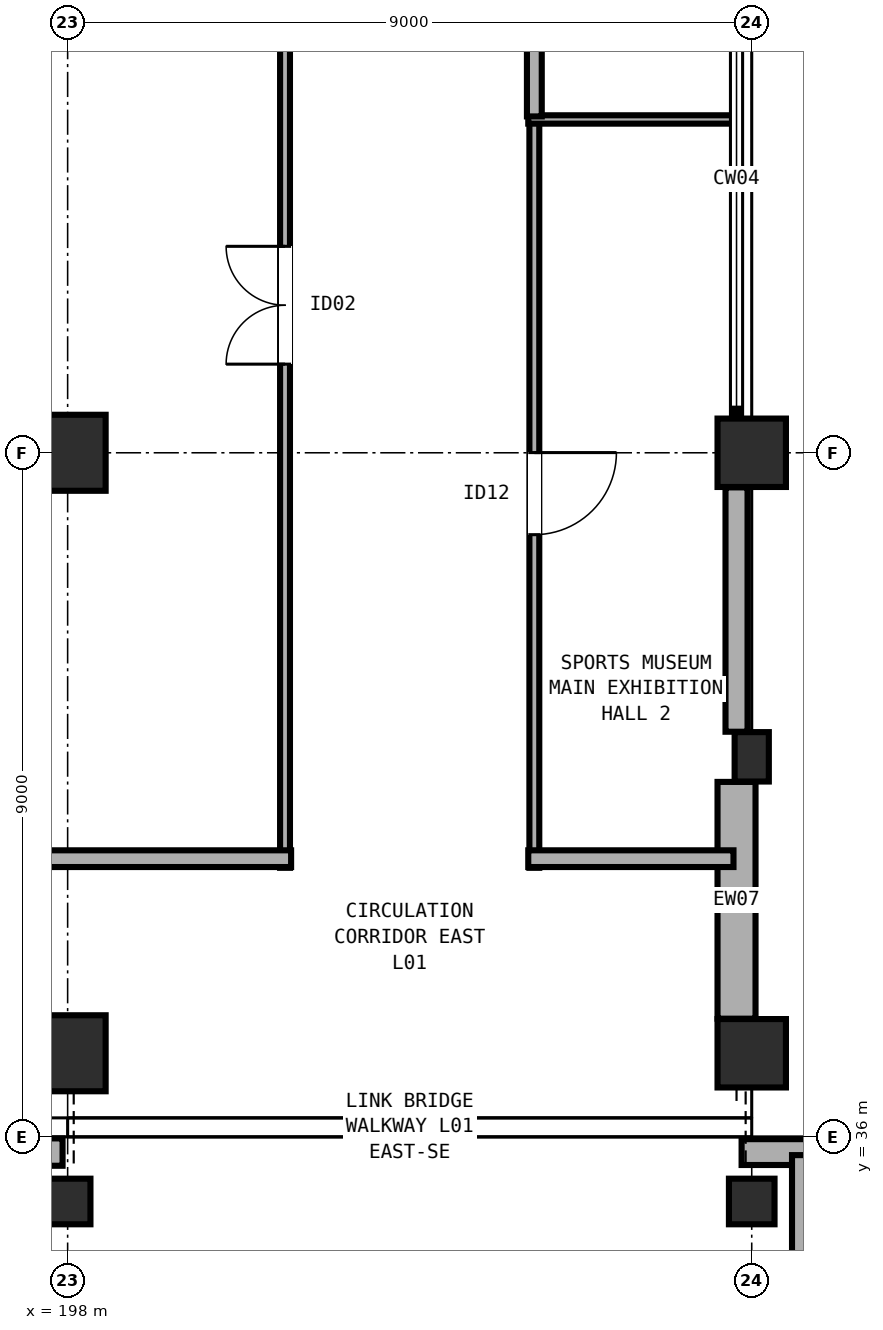
"""IFC4 building model, lengths in metres.
Left out: names, types, materials, properties, quantities, classifications, styles, units other than length and angle.
Written with IfcOpenShell. Run it as: python <this file> out.ifc"""

import sys

from ifc_helpers import new_model, si_unit, direction, frame, frame_2d, origin, origin_2d, place, context, subcontext, project, spatial, rectangle, extrude, element, fill, save


model = new_model("IFC4")
c1 = context("Model", 3, precision=1e-05, world=origin(), true_north=direction((0.0, 1.0)))
c2 = subcontext(c1, "Body", "Model", "MODEL_VIEW")
j1 = project(units=[si_unit("LENGTHUNIT", "METRE"), si_unit("PLANEANGLEUNIT", "RADIAN")], contexts=[c1])
p1 = place(None, origin())
s1 = spatial("IfcSite", under=j1, at=p1, CompositionType="ELEMENT")
p2 = place(p1, origin())
s2 = spatial("IfcBuilding", under=s1, at=p2, CompositionType="ELEMENT")
p3 = place(p2, frame((0.0, 0.0, 4.8)))
s3 = spatial("IfcBuildingStorey", under=s2, at=p3, CompositionType="ELEMENT", Elevation=4.8)
for number, where, z_axis, x_axis in (
    (1, (198.0, 37.1, 0.0), (0.0, 0.0, 1.0), (1.0, 0.0, 0.0)),
    (2, (198.0, 45.0, 0.0), (0.0, 0.0, 1.0), (1.0, 0.0, 0.0)),
):
    element("IfcColumn", number, at=place(p3, frame(where, z_axis=z_axis, x_axis=x_axis)), inside=s3, PredefinedType="COLUMN", context=c2, shape_type="SweptSolid", body=[
        extrude(rectangle(XDim=1.0, YDim=1.0, at=origin_2d()), origin(), (0.0, 0.0, 1.0), 4.8),
    ])
for number, where, z_axis, x_axis in (
    (3, (207.0, 37.1, 0.0), (0.0, 0.0, 1.0), (1.0, 0.0, 0.0)),
    (4, (207.0, 45.0, 0.0), (0.0, 0.0, 1.0), (1.0, 0.0, 0.0)),
):
    element("IfcColumn", number, at=place(p3, frame(where, z_axis=z_axis, x_axis=x_axis)), inside=s3, PredefinedType="COLUMN", context=c2, shape_type="SweptSolid", body=[
        extrude(rectangle(XDim=0.9, YDim=0.9, at=origin_2d()), origin(), (0.0, 0.0, 1.0), 4.8),
    ])
for number, where, z_axis, x_axis in (
    (5, (198.0, 35.15, 0.0), (0.0, 0.0, 1.0), (1.0, 0.0, 0.0)),
    (6, (207.0, 35.15, 0.0), (0.0, 0.0, 1.0), (1.0, 0.0, 0.0)),
):
    element("IfcColumn", number, at=place(p3, frame(where, z_axis=z_axis, x_axis=x_axis)), inside=s3, PredefinedType="COLUMN", context=c2, shape_type="SweptSolid", body=[
        extrude(rectangle(XDim=0.6, YDim=0.6, at=origin_2d()), origin(), (0.0, 0.0, 1.0), 4.8),
    ])
p4 = place(p3, frame((207.0, 41.0, 0.0), z_axis=(0.0, 0.0, 1.0), x_axis=(1.0, 0.0, 0.0)))
e7 = element("IfcColumn", 7, at=p4, inside=s3, PredefinedType="PILASTER", context=c2, shape_type="SweptSolid", body=[
    extrude(rectangle(XDim=0.45, YDim=0.65, at=origin_2d()), origin(), (0.0, 0.0, 1.0), 4.8),
])
p5 = place(p3, frame((206.8, 44.545, 0.0), z_axis=(0.0, 0.0, 1.0), x_axis=(0.0, -1.0, 0.0)))
e8 = element("IfcWall", 8, at=p5, inside=s3, PredefinedType="SOLIDWALL", context=c2, shape_type="SweptSolid", body=[
    extrude(rectangle(XDim=3.215, YDim=0.29, at=frame_2d((1.607, 0.0))), origin(), (0.0, 0.0, 1.0), 3.28),
])
p6 = place(p3, frame((206.8, 40.67, 0.0), z_axis=(0.0, 0.0, 1.0), x_axis=(0.0, -1.0, 0.0)))
e9 = element("IfcWall", 9, at=p6, inside=s3, PredefinedType="SOLIDWALL", context=c2, shape_type="SweptSolid", body=[
    extrude(rectangle(XDim=3.115, YDim=0.5, at=frame_2d((1.558, 0.0))), origin(), (0.0, 0.0, 1.0), 3.28),
])
p7 = place(p3, frame((189.0, 35.8, 0.0), z_axis=(0.0, 0.0, 1.0), x_axis=(1.0, 0.0, 0.0)))
e10 = element("IfcWall", 10, at=p7, inside=s3, PredefinedType="SOLIDWALL", context=c2, shape_type="SweptSolid", body=[
    extrude(rectangle(XDim=8.933, YDim=0.36, at=frame_2d((4.467, 0.0))), origin(), (0.0, 0.0, 1.0), 3.28),
])
p8 = place(p3, frame((206.867, 35.8, 0.0), z_axis=(0.0, 0.0, 1.0), x_axis=(1.0, 0.0, 0.0)))
e11 = element("IfcWall", 11, at=p8, inside=s3, PredefinedType="SOLIDWALL", context=c2, shape_type="SweptSolid", body=[
    extrude(rectangle(XDim=8.933, YDim=0.34, at=frame_2d((4.467, 0.0))), origin(), (0.0, 0.0, 1.0), 3.28),
])
p9 = place(p3, frame((200.86, 39.54, 0.0), z_axis=(0.0, 0.0, 1.0), x_axis=(0.0, 1.0, 0.0)))
e12 = element("IfcWall", 12, at=p9, inside=s3, PredefinedType="PARTITIONING", context=c2, shape_type="SweptSolid", body=[
    extrude(rectangle(XDim=14.802, YDim=0.13, at=frame_2d((7.401, 0.0))), origin(), (0.0, 0.0, 1.0), 3.28),
])
p10 = place(p9, frame((6.626, 0.0, 0.0)))
e13 = element("IfcOpeningElement", 13, at=p10, cuts=e12, PredefinedType="OPENING", context=c2, shape_type="SweptSolid", body=[
    extrude(rectangle(XDim=1.55, YDim=2.2, at=frame_2d((0.775, 1.1))), frame((0.0, 0.075, 0.0), z_axis=(0.0, -1.0, 0.0), x_axis=(1.0, 0.0, 0.0)), (0.0, 0.0, 1.0), 0.15),
])
p11 = place(p3, frame((200.94, 39.66, 0.0), z_axis=(0.0, 0.0, 1.0), x_axis=(-1.0, 0.0, 0.0)))
e14 = element("IfcWall", 14, at=p11, inside=s3, PredefinedType="PARTITIONING", context=c2, shape_type="SweptSolid", body=[
    extrude(rectangle(XDim=3.42, YDim=0.22, at=frame_2d((1.71, 0.0))), origin(), (0.0, 0.0, 1.0), 3.28),
])
p12 = place(p3, frame((204.14, 49.385, 0.0), z_axis=(0.0, 0.0, 1.0), x_axis=(0.0, -1.0, 0.0)))
e15 = element("IfcWall", 15, at=p12, inside=s3, PredefinedType="PARTITIONING", context=c2, shape_type="SweptSolid", body=[
    extrude(rectangle(XDim=9.845, YDim=0.13, at=frame_2d((4.922, 0.0))), origin(), (0.0, 0.0, 1.0), 3.28),
])
p13 = place(p12, frame((4.383, 0.0, 0.0)))
e16 = element("IfcOpeningElement", 16, at=p13, cuts=e15, PredefinedType="OPENING", context=c2, shape_type="SweptSolid", body=[
    extrude(rectangle(XDim=1.08, YDim=2.18, at=frame_2d((0.54, 1.09))), frame((0.0, 0.075, 0.0), z_axis=(0.0, -1.0, 0.0), x_axis=(1.0, 0.0, 0.0)), (0.0, 0.0, 1.0), 0.15),
])
p14 = place(p3, frame((204.06, 49.385, 0.0), z_axis=(0.0, 0.0, 1.0), x_axis=(1.0, 0.0, 0.0)))
e17 = element("IfcWall", 17, at=p14, inside=s3, PredefinedType="PARTITIONING", context=c2, shape_type="SweptSolid", body=[
    extrude(rectangle(XDim=2.707, YDim=0.11, at=frame_2d((1.354, 0.0))), origin(), (0.0, 0.0, 1.0), 3.28),
])
p15 = place(p3, frame((206.76, 39.66, 0.0), z_axis=(0.0, 0.0, 1.0), x_axis=(-1.0, 0.0, 0.0)))
e18 = element("IfcWall", 18, at=p15, inside=s3, PredefinedType="PARTITIONING", context=c2, shape_type="SweptSolid", body=[
    extrude(rectangle(XDim=2.7, YDim=0.22, at=frame_2d((1.35, 0.0))), origin(), (0.0, 0.0, 1.0), 3.28),
])
p16 = place(p3, frame((204.14, 49.425, 0.0), z_axis=(0.0, 0.0, 1.0), x_axis=(0.0, 1.0, 0.0)))
e19 = element("IfcWall", 19, at=p16, inside=s3, PredefinedType="PARTITIONING", context=c2, shape_type="SweptSolid", body=[
    extrude(rectangle(XDim=9.765, YDim=0.195, at=frame_2d((4.882, 0.0))), origin(), (0.0, 0.0, 1.0), 3.28),
])
p17 = place(p3, frame((207.64, 32.75, 0.0), z_axis=(0.0, 0.0, 1.0), x_axis=(0.0, 1.0, 0.0)))
e20 = element("IfcWall", 20, at=p17, inside=s3, PredefinedType="PARTITIONING", context=c2, shape_type="SweptSolid", body=[
    extrude(rectangle(XDim=3.01, YDim=0.22, at=frame_2d((1.505, 0.0))), origin(), (0.0, 0.0, 1.0), 3.28),
])
p18 = place(p10, origin())
e21 = element("IfcDoor", 21, at=p18, inside=s3, OperationType="DOUBLE_DOOR_SINGLE_SWING", PredefinedType="DOOR", context=c2, shape_type="SweptSolid", body=[
    extrude(rectangle(XDim=1.55, YDim=2.2, at=frame_2d((0.775, 1.1))), frame((0.0, 0.025, 0.0), z_axis=(0.0, -1.0, 0.0), x_axis=(1.0, 0.0, 0.0)), (0.0, 0.0, 1.0), 0.05),
])
fill(e13, e21)
p19 = place(p13, origin())
e22 = element("IfcDoor", 22, at=p19, inside=s3, OperationType="SINGLE_SWING_LEFT", PredefinedType="DOOR", context=c2, shape_type="SweptSolid", body=[
    extrude(rectangle(XDim=1.08, YDim=2.18, at=frame_2d((0.54, 1.09))), frame((0.0, 0.025, 0.0), z_axis=(0.0, -1.0, 0.0), x_axis=(1.0, 0.0, 0.0)), (0.0, 0.0, 1.0), 0.05),
])
fill(e16, e22)
save(model, sys.argv[1])
